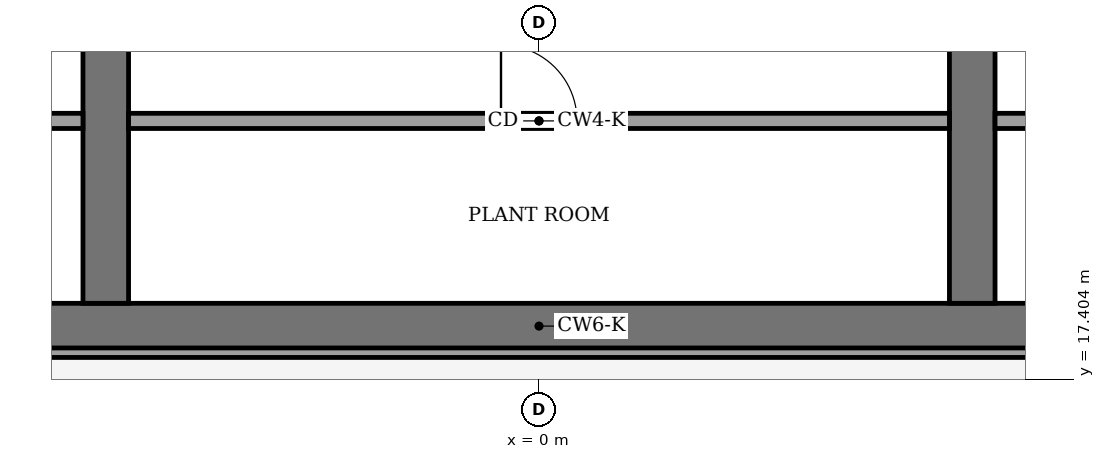
"""IFC4 building model, lengths in metres.
Left out: names, types, materials, properties, quantities, classifications, styles, units other than length and angle.
Written with IfcOpenShell. Run it as: python <this file> out.ifc"""

import sys

from ifc_helpers import new_model, si_unit, direction, frame, frame_2d, origin, place, context, subcontext, project, spatial, rectangle, extrude, element, fill, save


model = new_model("IFC4")
c1 = context("Model", 3, precision=1e-05, world=origin(), true_north=direction((0.0, 1.0)))
c2 = subcontext(c1, "Body", "Model", "MODEL_VIEW")
j1 = project(units=[si_unit("LENGTHUNIT", "METRE"), si_unit("PLANEANGLEUNIT", "RADIAN")], contexts=[c1])
p1 = place(None, origin())
s1 = spatial("IfcSite", under=j1, at=p1, CompositionType="ELEMENT")
p2 = place(p1, origin())
s2 = spatial("IfcBuilding", under=s1, at=p2, CompositionType="ELEMENT")
p3 = place(p2, frame((0.0, 0.0, 364.0)))
s3 = spatial("IfcBuildingStorey", under=s2, at=p3, CompositionType="ELEMENT", Elevation=364.0)
p4 = place(p3, frame((-13.2, 18.1, -0.15), z_axis=(0.0, 0.0, 1.0), x_axis=(1.0, 0.0, 0.0)))
e1 = element("IfcWall", 1, at=p4, inside=s3, PredefinedType="SHEAR", context=c2, shape_type="SweptSolid", body=[
    extrude(rectangle(XDim=26.4, YDim=0.6, at=frame_2d((13.2, 0.0))), origin(), (0.0, 0.0, 1.0), 4.0),
])
p5 = place(p3, frame((-5.7, 18.4, -0.15), z_axis=(0.0, 0.0, 1.0), x_axis=(0.0, 1.0, 0.0)))
e2 = element("IfcWall", 2, at=p5, inside=s3, PredefinedType="SHEAR", context=c2, shape_type="SweptSolid", body=[
    extrude(rectangle(XDim=19.2, YDim=0.6, at=frame_2d((9.6, 0.0))), origin(), (0.0, 0.0, 1.0), 4.0),
])
p6 = place(p5, frame((8.35, 0.0, 0.15)))
e3 = element("IfcOpeningElement", 3, at=p6, cuts=e2, PredefinedType="OPENING", context=c2, shape_type="SweptSolid", body=[
    extrude(rectangle(XDim=0.9, YDim=2.1, at=frame_2d((0.45, 1.05))), frame((0.0, 0.31, 0.0), z_axis=(0.0, -1.0, 0.0), x_axis=(1.0, 0.0, 0.0)), (0.0, 0.0, 1.0), 0.62),
])
p7 = place(p3, frame((5.7, 18.4, -0.15), z_axis=(0.0, 0.0, 1.0), x_axis=(0.0, 1.0, 0.0)))
e4 = element("IfcWall", 4, at=p7, inside=s3, PredefinedType="SHEAR", context=c2, shape_type="SweptSolid", body=[
    extrude(rectangle(XDim=19.2, YDim=0.6, at=frame_2d((9.6, 0.0))), origin(), (0.0, 0.0, 1.0), 4.0),
])
p8 = place(p7, frame((13.3, 0.0, 0.15)))
e5 = element("IfcOpeningElement", 5, at=p8, cuts=e4, PredefinedType="OPENING", context=c2, shape_type="SweptSolid", body=[
    extrude(rectangle(XDim=2.4, YDim=2.4, at=frame_2d((1.2, 1.2))), frame((0.0, 0.31, 0.0), z_axis=(0.0, -1.0, 0.0), x_axis=(1.0, 0.0, 0.0)), (0.0, 0.0, 1.0), 0.62),
])
p9 = place(p3, frame((-12.6, 20.8, 0.0), z_axis=(0.0, 0.0, 1.0), x_axis=(1.0, 0.0, 0.0)))
e6 = element("IfcWall", 6, at=p9, inside=s3, PredefinedType="PARTITIONING", context=c2, shape_type="SweptSolid", body=[
    extrude(rectangle(XDim=6.6, YDim=0.2, at=frame_2d((3.3, 0.0))), origin(), (0.0, 0.0, 1.0), 3.85),
])
p10 = place(p9, frame((2.8, 0.0, 0.0)))
e7 = element("IfcOpeningElement", 7, at=p10, cuts=e6, PredefinedType="OPENING", context=c2, shape_type="SweptSolid", body=[
    extrude(rectangle(XDim=1.0, YDim=2.1, at=frame_2d((0.5, 1.05))), frame((0.0, 0.11, 0.0), z_axis=(0.0, -1.0, 0.0), x_axis=(1.0, 0.0, 0.0)), (0.0, 0.0, 1.0), 0.22),
])
p11 = place(p3, frame((-5.4, 20.8, 0.0), z_axis=(0.0, 0.0, 1.0), x_axis=(1.0, 0.0, 0.0)))
e8 = element("IfcWall", 8, at=p11, inside=s3, PredefinedType="PARTITIONING", context=c2, shape_type="SweptSolid", body=[
    extrude(rectangle(XDim=10.8, YDim=0.2, at=frame_2d((5.4, 0.0))), origin(), (0.0, 0.0, 1.0), 3.85),
])
p12 = place(p11, frame((4.9, 0.0, 0.0)))
e9 = element("IfcOpeningElement", 9, at=p12, cuts=e8, PredefinedType="OPENING", context=c2, shape_type="SweptSolid", body=[
    extrude(rectangle(XDim=1.0, YDim=2.1, at=frame_2d((0.5, 1.05))), frame((0.0, 0.11, 0.0), z_axis=(0.0, -1.0, 0.0), x_axis=(1.0, 0.0, 0.0)), (0.0, 0.0, 1.0), 0.22),
])
p13 = place(p3, frame((6.0, 20.8, 0.0), z_axis=(0.0, 0.0, 1.0), x_axis=(1.0, 0.0, 0.0)))
e10 = element("IfcWall", 10, at=p13, inside=s3, PredefinedType="PARTITIONING", context=c2, shape_type="SweptSolid", body=[
    extrude(rectangle(XDim=6.6, YDim=0.2, at=frame_2d((3.3, 0.0))), origin(), (0.0, 0.0, 1.0), 3.85),
])
p14 = place(p13, frame((2.8, 0.0, 0.0)))
e11 = element("IfcOpeningElement", 11, at=p14, cuts=e10, PredefinedType="OPENING", context=c2, shape_type="SweptSolid", body=[
    extrude(rectangle(XDim=1.0, YDim=2.1, at=frame_2d((0.5, 1.05))), frame((0.0, 0.11, 0.0), z_axis=(0.0, -1.0, 0.0), x_axis=(1.0, 0.0, 0.0)), (0.0, 0.0, 1.0), 0.22),
])
p15 = place(p3, frame((-13.2, 17.75, 0.0), z_axis=(0.0, 0.0, 1.0), x_axis=(1.0, 0.0, 0.0)))
e12 = element("IfcWall", 12, at=p15, inside=s3, PredefinedType="PARTITIONING", context=c2, shape_type="SweptSolid", body=[
    extrude(rectangle(XDim=26.4, YDim=0.125, at=frame_2d((13.2, 0.0))), origin(), (0.0, 0.0, 1.0), 3.52),
])
p16 = place(p12, origin())
e13 = element("IfcDoor", 13, at=p16, inside=s3, OperationType="SINGLE_SWING_LEFT", PredefinedType="DOOR", context=c2, shape_type="SweptSolid", body=[
    extrude(rectangle(XDim=1.0, YDim=2.1, at=frame_2d((0.5, 1.05))), frame((0.0, 0.025, 0.0), z_axis=(0.0, -1.0, 0.0), x_axis=(1.0, 0.0, 0.0)), (0.0, 0.0, 1.0), 0.05),
])
fill(e9, e13)
save(model, sys.argv[1])
